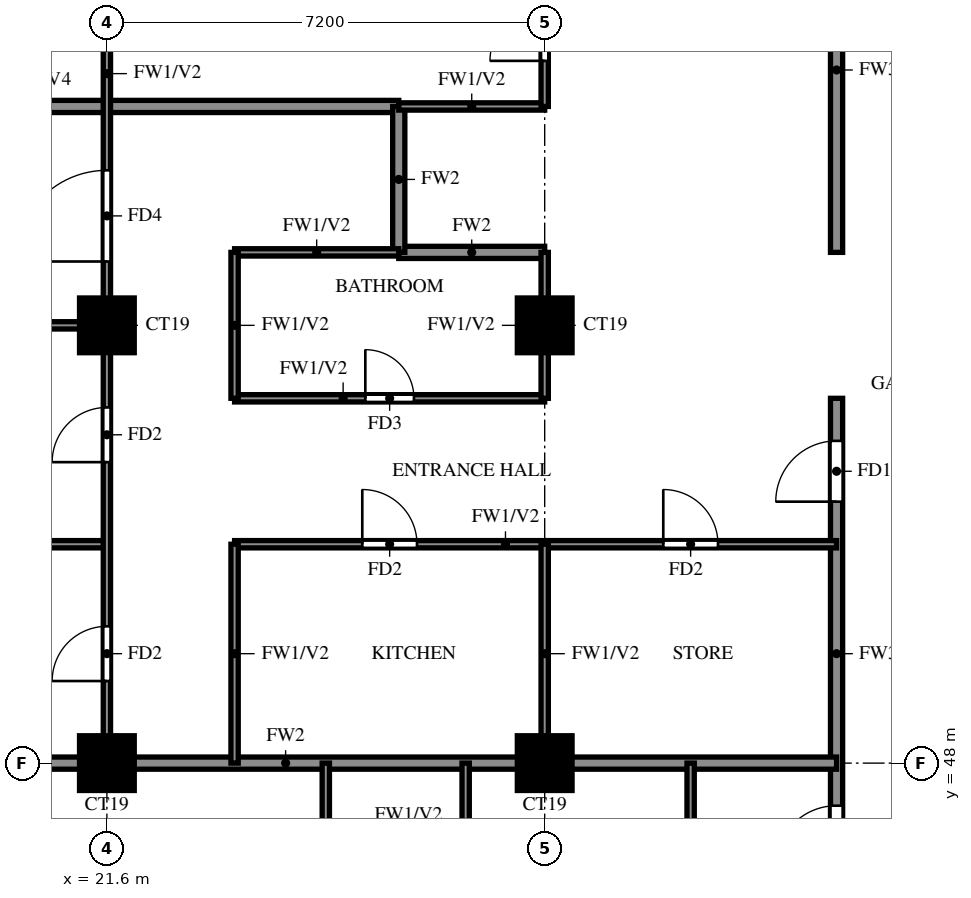
"""IFC4 building model, lengths in metres.
Left out: names, types, materials, properties, quantities, classifications, styles, units other than length and angle.
Written with IfcOpenShell. Run it as: python <this file> out.ifc"""

import sys

from ifc_helpers import new_model, si_unit, direction, frame, frame_2d, origin, origin_2d, place, context, subcontext, project, spatial, rectangle, extrude, source, transform, mapped, element, fill, save


model = new_model("IFC4")
c1 = context("Model", 3, precision=1e-05, world=origin(), true_north=direction((0.0, 1.0)))
c2 = subcontext(c1, "Body", "Model", "MODEL_VIEW")
j1 = project(units=[si_unit("LENGTHUNIT", "METRE"), si_unit("PLANEANGLEUNIT", "RADIAN")], contexts=[c1])
p1 = place(None, origin())
s1 = spatial("IfcSite", under=j1, at=p1, CompositionType="ELEMENT")
p2 = place(p1, origin())
s2 = spatial("IfcBuilding", under=s1, at=p2, CompositionType="ELEMENT")
p3 = place(p2, frame((0.0, 0.0, 192.0)))
s3 = spatial("IfcBuildingStorey", under=s2, at=p3, CompositionType="ELEMENT", Elevation=192.0)
m1 = source(origin(), c2, "Body", "SweptSolid", [
    extrude(rectangle(XDim=0.9, YDim=0.9, at=origin_2d()), origin(), (0.0, 0.0, 1.0), 3.2),
])
for number, where, z_axis, x_axis in (
    (1, (21.6, 48.0, 0.0), (0.0, 0.0, 1.0), (1.0, 0.0, 0.0)),
    (2, (28.8, 48.0, 0.0), (0.0, 0.0, 1.0), (1.0, 0.0, 0.0)),
    (3, (21.6, 55.2, 0.0), (0.0, 0.0, 1.0), (1.0, 0.0, 0.0)),
    (4, (28.8, 55.2, 0.0), (0.0, 0.0, 1.0), (1.0, 0.0, 0.0)),
):
    element("IfcColumn", number, at=place(p3, frame(where, z_axis=z_axis, x_axis=x_axis)), inside=s3, PredefinedType="COLUMN", context=c2, shape_type="MappedRepresentation", body=[
        mapped(m1, transform((0.0, 0.0, 0.0))),
    ])
p4 = place(p3, frame((33.6, 45.6, 0.0), z_axis=(0.0, 0.0, 1.0), x_axis=(0.0, 1.0, 0.0)))
e5 = element("IfcWall", 5, at=p4, inside=s3, PredefinedType="SOLIDWALL", context=c2, shape_type="SweptSolid", body=[
    extrude(rectangle(XDim=8.4, YDim=0.2, at=frame_2d((4.2, 0.0))), origin(), (0.0, 0.0, 1.0), 3.2),
])
p5 = place(p4, frame((0.7, 0.0, 0.0)))
e6 = element("IfcOpeningElement", 6, at=p5, cuts=e5, PredefinedType="OPENING", context=c2, shape_type="SweptSolid", body=[
    extrude(rectangle(XDim=1.0, YDim=2.1, at=frame_2d((0.5, 1.05))), frame((0.0, 0.11, 0.0), z_axis=(0.0, -1.0, 0.0), x_axis=(1.0, 0.0, 0.0)), (0.0, 0.0, 1.0), 0.22),
])
p6 = place(p4, frame((6.7, 0.0, 0.0)))
e7 = element("IfcOpeningElement", 7, at=p6, cuts=e5, PredefinedType="OPENING", context=c2, shape_type="SweptSolid", body=[
    extrude(rectangle(XDim=1.0, YDim=2.1, at=frame_2d((0.5, 1.05))), frame((0.0, 0.11, 0.0), z_axis=(0.0, -1.0, 0.0), x_axis=(1.0, 0.0, 0.0)), (0.0, 0.0, 1.0), 0.22),
])
p7 = place(p3, frame((33.6, 56.4, 0.0), z_axis=(0.0, 0.0, 1.0), x_axis=(0.0, 1.0, 0.0)))
e8 = element("IfcWall", 8, at=p7, inside=s3, PredefinedType="SOLIDWALL", context=c2, shape_type="SweptSolid", body=[
    extrude(rectangle(XDim=6.0, YDim=0.2, at=frame_2d((3.0, 0.0))), origin(), (0.0, 0.0, 1.0), 3.2),
])
p8 = place(p7, frame((3.7, 0.0, 0.0)))
e9 = element("IfcOpeningElement", 9, at=p8, cuts=e8, PredefinedType="OPENING", context=c2, shape_type="SweptSolid", body=[
    extrude(rectangle(XDim=1.0, YDim=2.1, at=frame_2d((0.5, 1.05))), frame((0.0, 0.11, 0.0), z_axis=(0.0, -1.0, 0.0), x_axis=(1.0, 0.0, 0.0)), (0.0, 0.0, 1.0), 0.22),
])
p9 = place(p3, frame((14.525, 48.0, 0.0), z_axis=(0.0, 0.0, 1.0), x_axis=(1.0, 0.0, 0.0)))
e10 = element("IfcWall", 10, at=p9, inside=s3, PredefinedType="SOLIDWALL", context=c2, shape_type="SweptSolid", body=[
    extrude(rectangle(XDim=19.075, YDim=0.2, at=frame_2d((9.538, 0.0))), origin(), (0.0, 0.0, 1.0), 3.2),
])
p10 = place(p3, frame((26.4, 56.4, 0.0), z_axis=(0.0, 0.0, 1.0), x_axis=(1.0, 0.0, 0.0)))
e11 = element("IfcWall", 11, at=p10, inside=s3, PredefinedType="SOLIDWALL", context=c2, shape_type="SweptSolid", body=[
    extrude(rectangle(XDim=2.4, YDim=0.2, at=frame_2d((1.2, 0.0))), origin(), (0.0, 0.0, 1.0), 3.2),
])
p11 = place(p3, frame((14.525, 58.8, 0.0), z_axis=(0.0, 0.0, 1.0), x_axis=(1.0, 0.0, 0.0)))
e12 = element("IfcWall", 12, at=p11, inside=s3, PredefinedType="SOLIDWALL", context=c2, shape_type="SweptSolid", body=[
    extrude(rectangle(XDim=11.875, YDim=0.2, at=frame_2d((5.938, 0.0))), origin(), (0.0, 0.0, 1.0), 2.3),
])
p12 = place(p3, frame((26.4, 56.4, 0.0), z_axis=(0.0, 0.0, 1.0), x_axis=(0.0, 1.0, 0.0)))
e13 = element("IfcWall", 13, at=p12, inside=s3, PredefinedType="SOLIDWALL", context=c2, shape_type="SweptSolid", body=[
    extrude(rectangle(XDim=2.4, YDim=0.2, at=frame_2d((1.2, 0.0))), origin(), (0.0, 0.0, 1.0), 3.2),
])
p13 = place(p3, frame((14.525, 51.6, 0.0), z_axis=(0.0, 0.0, 1.0), x_axis=(1.0, 0.0, 0.0)))
e14 = element("IfcWall", 14, at=p13, inside=s3, PredefinedType="PARTITIONING", context=c2, shape_type="SweptSolid", body=[
    extrude(rectangle(XDim=7.075, YDim=0.12, at=frame_2d((3.538, 0.0))), origin(), (0.0, 0.0, 1.0), 2.3),
])
p14 = place(p3, frame((23.7, 51.6, 0.0), z_axis=(0.0, 0.0, 1.0), x_axis=(1.0, 0.0, 0.0)))
e15 = element("IfcWall", 15, at=p14, inside=s3, PredefinedType="PARTITIONING", context=c2, shape_type="SweptSolid", body=[
    extrude(rectangle(XDim=9.9, YDim=0.12, at=frame_2d((4.95, 0.0))), origin(), (0.0, 0.0, 1.0), 3.2),
])
p15 = place(p14, frame((2.1, 0.0, 0.0)))
e16 = element("IfcOpeningElement", 16, at=p15, cuts=e15, PredefinedType="OPENING", context=c2, shape_type="SweptSolid", body=[
    extrude(rectangle(XDim=0.9, YDim=2.1, at=frame_2d((0.45, 1.05))), frame((0.0, 0.07, 0.0), z_axis=(0.0, -1.0, 0.0), x_axis=(1.0, 0.0, 0.0)), (0.0, 0.0, 1.0), 0.14),
])
p16 = place(p14, frame((7.05, 0.0, 0.0)))
e17 = element("IfcOpeningElement", 17, at=p16, cuts=e15, PredefinedType="OPENING", context=c2, shape_type="SweptSolid", body=[
    extrude(rectangle(XDim=0.9, YDim=2.1, at=frame_2d((0.45, 1.05))), frame((0.0, 0.07, 0.0), z_axis=(0.0, -1.0, 0.0), x_axis=(1.0, 0.0, 0.0)), (0.0, 0.0, 1.0), 0.14),
])
p17 = place(p3, frame((23.7, 54.0, 0.0), z_axis=(0.0, 0.0, 1.0), x_axis=(1.0, 0.0, 0.0)))
e18 = element("IfcWall", 18, at=p17, inside=s3, PredefinedType="PARTITIONING", context=c2, shape_type="SweptSolid", body=[
    extrude(rectangle(XDim=5.1, YDim=0.12, at=frame_2d((2.55, 0.0))), origin(), (0.0, 0.0, 1.0), 3.2),
])
p18 = place(p17, frame((2.15, 0.0, 0.0)))
e19 = element("IfcOpeningElement", 19, at=p18, cuts=e18, PredefinedType="OPENING", context=c2, shape_type="SweptSolid", body=[
    extrude(rectangle(XDim=0.8, YDim=2.1, at=frame_2d((0.4, 1.05))), frame((0.0, 0.07, 0.0), z_axis=(0.0, -1.0, 0.0), x_axis=(1.0, 0.0, 0.0)), (0.0, 0.0, 1.0), 0.14),
])
p19 = place(p3, frame((14.525, 55.2, 0.0), z_axis=(0.0, 0.0, 1.0), x_axis=(1.0, 0.0, 0.0)))
e20 = element("IfcWall", 20, at=p19, inside=s3, PredefinedType="PARTITIONING", context=c2, shape_type="SweptSolid", body=[
    extrude(rectangle(XDim=7.075, YDim=0.12, at=frame_2d((3.538, 0.0))), origin(), (0.0, 0.0, 1.0), 3.2),
])
p20 = place(p3, frame((23.7, 56.4, 0.0), z_axis=(0.0, 0.0, 1.0), x_axis=(1.0, 0.0, 0.0)))
e21 = element("IfcWall", 21, at=p20, inside=s3, PredefinedType="PARTITIONING", context=c2, shape_type="SweptSolid", body=[
    extrude(rectangle(XDim=2.7, YDim=0.12, at=frame_2d((1.35, 0.0))), origin(), (0.0, 0.0, 1.0), 3.2),
])
p21 = place(p3, frame((26.4, 58.8, 0.0), z_axis=(0.0, 0.0, 1.0), x_axis=(1.0, 0.0, 0.0)))
e22 = element("IfcWall", 22, at=p21, inside=s3, PredefinedType="PARTITIONING", context=c2, shape_type="SweptSolid", body=[
    extrude(rectangle(XDim=2.4, YDim=0.12, at=frame_2d((1.2, 0.0))), origin(), (0.0, 0.0, 1.0), 3.2),
])
p22 = place(p3, frame((21.6, 48.0, 0.0), z_axis=(0.0, 0.0, 1.0), x_axis=(0.0, 1.0, 0.0)))
e23 = element("IfcWall", 23, at=p22, inside=s3, PredefinedType="PARTITIONING", context=c2, shape_type="SweptSolid", body=[
    extrude(rectangle(XDim=25.2, YDim=0.12, at=frame_2d((12.6, 0.0))), origin(), (0.0, 0.0, 1.0), 3.2),
])
p23 = place(p22, frame((1.35, 0.0, 0.0)))
e24 = element("IfcOpeningElement", 24, at=p23, cuts=e23, PredefinedType="OPENING", context=c2, shape_type="SweptSolid", body=[
    extrude(rectangle(XDim=0.9, YDim=2.1, at=frame_2d((0.45, 1.05))), frame((0.0, 0.07, 0.0), z_axis=(0.0, -1.0, 0.0), x_axis=(1.0, 0.0, 0.0)), (0.0, 0.0, 1.0), 0.14),
])
p24 = place(p22, frame((4.95, 0.0, 0.0)))
e25 = element("IfcOpeningElement", 25, at=p24, cuts=e23, PredefinedType="OPENING", context=c2, shape_type="SweptSolid", body=[
    extrude(rectangle(XDim=0.9, YDim=2.1, at=frame_2d((0.45, 1.05))), frame((0.0, 0.07, 0.0), z_axis=(0.0, -1.0, 0.0), x_axis=(1.0, 0.0, 0.0)), (0.0, 0.0, 1.0), 0.14),
])
p25 = place(p22, frame((8.25, 0.0, 0.0)))
e26 = element("IfcOpeningElement", 26, at=p25, cuts=e23, PredefinedType="OPENING", context=c2, shape_type="SweptSolid", body=[
    extrude(rectangle(XDim=1.5, YDim=2.1, at=frame_2d((0.75, 1.05))), frame((0.0, 0.07, 0.0), z_axis=(0.0, -1.0, 0.0), x_axis=(1.0, 0.0, 0.0)), (0.0, 0.0, 1.0), 0.14),
])
p26 = place(p22, frame((12.15, 0.0, 0.0)))
e27 = element("IfcOpeningElement", 27, at=p26, cuts=e23, PredefinedType="OPENING", context=c2, shape_type="SweptSolid", body=[
    extrude(rectangle(XDim=0.9, YDim=2.1, at=frame_2d((0.45, 1.05))), frame((0.0, 0.07, 0.0), z_axis=(0.0, -1.0, 0.0), x_axis=(1.0, 0.0, 0.0)), (0.0, 0.0, 1.0), 0.14),
])
p27 = place(p22, frame((15.75, 0.0, 0.0)))
e28 = element("IfcOpeningElement", 28, at=p27, cuts=e23, PredefinedType="OPENING", context=c2, shape_type="SweptSolid", body=[
    extrude(rectangle(XDim=0.9, YDim=2.1, at=frame_2d((0.45, 1.05))), frame((0.0, 0.07, 0.0), z_axis=(0.0, -1.0, 0.0), x_axis=(1.0, 0.0, 0.0)), (0.0, 0.0, 1.0), 0.14),
])
p28 = place(p22, frame((19.35, 0.0, 0.0)))
e29 = element("IfcOpeningElement", 29, at=p28, cuts=e23, PredefinedType="OPENING", context=c2, shape_type="SweptSolid", body=[
    extrude(rectangle(XDim=0.9, YDim=2.1, at=frame_2d((0.45, 1.05))), frame((0.0, 0.07, 0.0), z_axis=(0.0, -1.0, 0.0), x_axis=(1.0, 0.0, 0.0)), (0.0, 0.0, 1.0), 0.14),
])
p29 = place(p22, frame((22.95, 0.0, 0.0)))
e30 = element("IfcOpeningElement", 30, at=p29, cuts=e23, PredefinedType="OPENING", context=c2, shape_type="SweptSolid", body=[
    extrude(rectangle(XDim=0.9, YDim=2.1, at=frame_2d((0.45, 1.05))), frame((0.0, 0.07, 0.0), z_axis=(0.0, -1.0, 0.0), x_axis=(1.0, 0.0, 0.0)), (0.0, 0.0, 1.0), 0.14),
])
p30 = place(p3, frame((23.7, 48.0, 0.0), z_axis=(0.0, 0.0, 1.0), x_axis=(0.0, 1.0, 0.0)))
e31 = element("IfcWall", 31, at=p30, inside=s3, PredefinedType="PARTITIONING", context=c2, shape_type="SweptSolid", body=[
    extrude(rectangle(XDim=3.6, YDim=0.12, at=frame_2d((1.8, 0.0))), origin(), (0.0, 0.0, 1.0), 3.2),
])
p31 = place(p3, frame((23.7, 54.0, 0.0), z_axis=(0.0, 0.0, 1.0), x_axis=(0.0, 1.0, 0.0)))
e32 = element("IfcWall", 32, at=p31, inside=s3, PredefinedType="PARTITIONING", context=c2, shape_type="SweptSolid", body=[
    extrude(rectangle(XDim=2.4, YDim=0.12, at=frame_2d((1.2, 0.0))), origin(), (0.0, 0.0, 1.0), 3.2),
])
p32 = place(p3, frame((25.2, 39.725, 0.0), z_axis=(0.0, 0.0, 1.0), x_axis=(0.0, 1.0, 0.0)))
e33 = element("IfcWall", 33, at=p32, inside=s3, PredefinedType="PARTITIONING", context=c2, shape_type="SweptSolid", body=[
    extrude(rectangle(XDim=8.275, YDim=0.12, at=frame_2d((4.137, 0.0))), origin(), (0.0, 0.0, 1.0), 3.2),
])
p33 = place(p32, frame((4.525, 0.0, 0.0)))
e34 = element("IfcOpeningElement", 34, at=p33, cuts=e33, PredefinedType="OPENING", context=c2, shape_type="SweptSolid", body=[
    extrude(rectangle(XDim=0.9, YDim=2.1, at=frame_2d((0.45, 1.05))), frame((0.0, 0.07, 0.0), z_axis=(0.0, -1.0, 0.0), x_axis=(1.0, 0.0, 0.0)), (0.0, 0.0, 1.0), 0.14),
])
p34 = place(p3, frame((27.5, 45.6, 0.0), z_axis=(0.0, 0.0, 1.0), x_axis=(0.0, 1.0, 0.0)))
e35 = element("IfcWall", 35, at=p34, inside=s3, PredefinedType="PARTITIONING", context=c2, shape_type="SweptSolid", body=[
    extrude(rectangle(XDim=2.4, YDim=0.12, at=frame_2d((1.2, 0.0))), origin(), (0.0, 0.0, 1.0), 3.2),
])
p35 = place(p3, frame((28.8, 48.0, 0.0), z_axis=(0.0, 0.0, 1.0), x_axis=(0.0, 1.0, 0.0)))
e36 = element("IfcWall", 36, at=p35, inside=s3, PredefinedType="PARTITIONING", context=c2, shape_type="SweptSolid", body=[
    extrude(rectangle(XDim=3.6, YDim=0.12, at=frame_2d((1.8, 0.0))), origin(), (0.0, 0.0, 1.0), 3.2),
])
p36 = place(p3, frame((28.8, 54.0, 0.0), z_axis=(0.0, 0.0, 1.0), x_axis=(0.0, 1.0, 0.0)))
e37 = element("IfcWall", 37, at=p36, inside=s3, PredefinedType="PARTITIONING", context=c2, shape_type="SweptSolid", body=[
    extrude(rectangle(XDim=2.4, YDim=0.12, at=frame_2d((1.2, 0.0))), origin(), (0.0, 0.0, 1.0), 3.2),
])
p37 = place(p3, frame((28.8, 58.8, 0.0), z_axis=(0.0, 0.0, 1.0), x_axis=(0.0, 1.0, 0.0)))
e38 = element("IfcWall", 38, at=p37, inside=s3, PredefinedType="PARTITIONING", context=c2, shape_type="SweptSolid", body=[
    extrude(rectangle(XDim=3.6, YDim=0.12, at=frame_2d((1.8, 0.0))), origin(), (0.0, 0.0, 1.0), 3.2),
])
p38 = place(p37, frame((0.75, 0.0, 0.0)))
e39 = element("IfcOpeningElement", 39, at=p38, cuts=e38, PredefinedType="OPENING", context=c2, shape_type="SweptSolid", body=[
    extrude(rectangle(XDim=0.9, YDim=2.1, at=frame_2d((0.45, 1.05))), frame((0.0, 0.07, 0.0), z_axis=(0.0, -1.0, 0.0), x_axis=(1.0, 0.0, 0.0)), (0.0, 0.0, 1.0), 0.14),
])
p39 = place(p3, frame((31.2, 45.6, 0.0), z_axis=(0.0, 0.0, 1.0), x_axis=(0.0, 1.0, 0.0)))
e40 = element("IfcWall", 40, at=p39, inside=s3, PredefinedType="PARTITIONING", context=c2, shape_type="SweptSolid", body=[
    extrude(rectangle(XDim=2.4, YDim=0.12, at=frame_2d((1.2, 0.0))), origin(), (0.0, 0.0, 1.0), 3.2),
])
p40 = place(p5, origin())
e41 = element("IfcDoor", 41, at=p40, inside=s3, OperationType="SINGLE_SWING_RIGHT", PredefinedType="DOOR", context=c2, shape_type="SweptSolid", body=[
    extrude(rectangle(XDim=1.0, YDim=2.1, at=frame_2d((0.5, 1.05))), frame((0.0, 0.025, 0.0), z_axis=(0.0, -1.0, 0.0), x_axis=(1.0, 0.0, 0.0)), (0.0, 0.0, 1.0), 0.05),
])
fill(e6, e41)
p41 = place(p6, origin())
e42 = element("IfcDoor", 42, at=p41, inside=s3, OperationType="SINGLE_SWING_LEFT", PredefinedType="DOOR", context=c2, shape_type="SweptSolid", body=[
    extrude(rectangle(XDim=1.0, YDim=2.1, at=frame_2d((0.5, 1.05))), frame((0.0, 0.025, 0.0), z_axis=(0.0, -1.0, 0.0), x_axis=(1.0, 0.0, 0.0)), (0.0, 0.0, 1.0), 0.05),
])
fill(e7, e42)
p42 = place(p23, origin())
e43 = element("IfcDoor", 43, at=p42, inside=s3, OperationType="SINGLE_SWING_LEFT", PredefinedType="DOOR", context=c2, shape_type="SweptSolid", body=[
    extrude(rectangle(XDim=0.9, YDim=2.1, at=frame_2d((0.45, 1.05))), frame((0.0, 0.025, 0.0), z_axis=(0.0, -1.0, 0.0), x_axis=(1.0, 0.0, 0.0)), (0.0, 0.0, 1.0), 0.05),
])
fill(e24, e43)
p43 = place(p24, origin())
e44 = element("IfcDoor", 44, at=p43, inside=s3, OperationType="SINGLE_SWING_RIGHT", PredefinedType="DOOR", context=c2, shape_type="SweptSolid", body=[
    extrude(rectangle(XDim=0.9, YDim=2.1, at=frame_2d((0.45, 1.05))), frame((0.0, 0.025, 0.0), z_axis=(0.0, -1.0, 0.0), x_axis=(1.0, 0.0, 0.0)), (0.0, 0.0, 1.0), 0.05),
])
fill(e25, e44)
p44 = place(p25, origin())
e45 = element("IfcDoor", 45, at=p44, inside=s3, OperationType="SINGLE_SWING_LEFT", PredefinedType="DOOR", context=c2, shape_type="SweptSolid", body=[
    extrude(rectangle(XDim=1.5, YDim=2.1, at=frame_2d((0.75, 1.05))), frame((0.0, 0.025, 0.0), z_axis=(0.0, -1.0, 0.0), x_axis=(1.0, 0.0, 0.0)), (0.0, 0.0, 1.0), 0.05),
])
fill(e26, e45)
p45 = place(p15, origin())
e46 = element("IfcDoor", 46, at=p45, inside=s3, OperationType="SINGLE_SWING_LEFT", PredefinedType="DOOR", context=c2, shape_type="SweptSolid", body=[
    extrude(rectangle(XDim=0.9, YDim=2.1, at=frame_2d((0.45, 1.05))), frame((0.0, 0.025, 0.0), z_axis=(0.0, -1.0, 0.0), x_axis=(1.0, 0.0, 0.0)), (0.0, 0.0, 1.0), 0.05),
])
fill(e16, e46)
p46 = place(p18, origin())
e47 = element("IfcDoor", 47, at=p46, inside=s3, OperationType="SINGLE_SWING_RIGHT", PredefinedType="DOOR", context=c2, shape_type="SweptSolid", body=[
    extrude(rectangle(XDim=0.8, YDim=2.1, at=frame_2d((0.4, 1.05))), frame((0.0, 0.025, 0.0), z_axis=(0.0, -1.0, 0.0), x_axis=(1.0, 0.0, 0.0)), (0.0, 0.0, 1.0), 0.05),
])
fill(e19, e47)
p47 = place(p16, origin())
e48 = element("IfcDoor", 48, at=p47, inside=s3, OperationType="SINGLE_SWING_LEFT", PredefinedType="DOOR", context=c2, shape_type="SweptSolid", body=[
    extrude(rectangle(XDim=0.9, YDim=2.1, at=frame_2d((0.45, 1.05))), frame((0.0, 0.025, 0.0), z_axis=(0.0, -1.0, 0.0), x_axis=(1.0, 0.0, 0.0)), (0.0, 0.0, 1.0), 0.05),
])
fill(e17, e48)
p48 = place(p38, origin())
e49 = element("IfcDoor", 49, at=p48, inside=s3, OperationType="SINGLE_SWING_LEFT", PredefinedType="DOOR", context=c2, shape_type="SweptSolid", body=[
    extrude(rectangle(XDim=0.9, YDim=2.1, at=frame_2d((0.45, 1.05))), frame((0.0, 0.025, 0.0), z_axis=(0.0, -1.0, 0.0), x_axis=(1.0, 0.0, 0.0)), (0.0, 0.0, 1.0), 0.05),
])
fill(e39, e49)
save(model, sys.argv[1])
